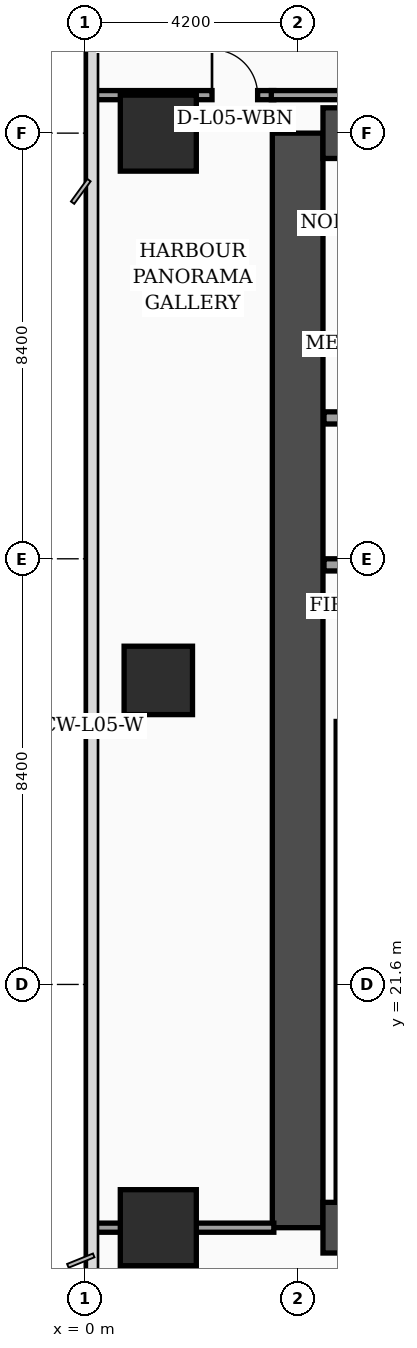
"""IFC4 building model, lengths in metres.
Left out: names, types, materials, properties, quantities, classifications, styles, units other than length and angle.
Written with IfcOpenShell. Run it as: python <this file> out.ifc"""

import sys

from ifc_helpers import new_model, si_unit, direction, frame, frame_2d, origin, origin_2d, place, context, subcontext, project, spatial, rectangle, extrude, element, fill, save


model = new_model("IFC4")
c1 = context("Model", 3, precision=1e-05, world=origin(), true_north=direction((0.0, 1.0)))
c2 = subcontext(c1, "Body", "Model", "MODEL_VIEW")
j1 = project(units=[si_unit("LENGTHUNIT", "METRE"), si_unit("PLANEANGLEUNIT", "RADIAN")], contexts=[c1])
p1 = place(None, origin())
s1 = spatial("IfcSite", under=j1, at=p1, CompositionType="ELEMENT")
p2 = place(p1, origin())
s2 = spatial("IfcBuilding", under=s1, at=p2, CompositionType="ELEMENT")
p3 = place(p2, frame((0.0, 0.0, 27.0)))
s3 = spatial("IfcBuildingStorey", under=s2, at=p3, CompositionType="ELEMENT", Elevation=27.0)
p4 = place(p3, frame((4.2, 16.8, 0.0), z_axis=(0.0, 0.0, 1.0), x_axis=(0.0, 1.0, 0.0)))
e1 = element("IfcWall", 1, at=p4, inside=s3, PredefinedType="SHEAR", context=c2, shape_type="SweptSolid", body=[
    extrude(rectangle(XDim=21.6, YDim=1.0, at=frame_2d((10.8, 0.0))), origin(), (0.0, 0.0, 1.0), 3.56),
])
for number, where, z_axis, x_axis in (
    (2, (4.7, 38.4, 0.0), (0.0, 0.0, 1.0), (1.0, 0.0, 0.0)),
    (3, (4.7, 16.8, 0.0), (0.0, 0.0, 1.0), (1.0, 0.0, 0.0)),
):
    element("IfcWall", number, at=place(p3, frame(where, z_axis=z_axis, x_axis=x_axis)), inside=s3, PredefinedType="SHEAR", context=c2, shape_type="SweptSolid", body=[
        extrude(rectangle(XDim=9.8, YDim=1.0, at=frame_2d((4.9, 0.0))), origin(), (0.0, 0.0, 1.0), 3.56),
    ])
p5 = place(p3, frame((5.08, 17.3, 0.0), z_axis=(0.0, 0.0, 1.0), x_axis=(0.0, 1.0, 0.0)))
e4 = element("IfcWall", 4, at=p5, inside=s3, PredefinedType="SOLIDWALL", context=c2, shape_type="SweptSolid", body=[
    extrude(rectangle(XDim=9.49, YDim=0.24, at=frame_2d((4.745, 0.0))), origin(), (0.0, 0.0, 1.0), 3.56),
])
p6 = place(p3, frame((1.45, 16.8, 0.0), z_axis=(0.0, 0.0, 1.0), x_axis=(1.0, 0.0, 0.0)))
e5 = element("IfcColumn", 5, at=p6, inside=s3, PredefinedType="COLUMN", context=c2, shape_type="SweptSolid", body=[
    extrude(rectangle(XDim=1.5, YDim=1.5, at=origin_2d()), origin(), (0.0, 0.0, 1.0), 3.56),
])
p7 = place(p3, frame((1.45, 27.6, 0.0), z_axis=(0.0, 0.0, 1.0), x_axis=(1.0, 0.0, 0.0)))
e6 = element("IfcColumn", 6, at=p7, inside=s3, PredefinedType="COLUMN", context=c2, shape_type="SweptSolid", body=[
    extrude(rectangle(XDim=1.35, YDim=1.35, at=origin_2d()), origin(), (0.0, 0.0, 1.0), 3.56),
])
p8 = place(p3, frame((1.45, 38.4, 0.0), z_axis=(0.0, 0.0, 1.0), x_axis=(1.0, 0.0, 0.0)))
e7 = element("IfcColumn", 7, at=p8, inside=s3, PredefinedType="COLUMN", context=c2, shape_type="SweptSolid", body=[
    extrude(rectangle(XDim=1.5, YDim=1.5, at=origin_2d()), origin(), (0.0, 0.0, 1.0), 3.56),
])
p9 = place(p3, frame((4.72, 29.88, 0.0), z_axis=(0.0, 0.0, 1.0), x_axis=(1.0, 0.0, 0.0)))
e8 = element("IfcWall", 8, at=p9, inside=s3, PredefinedType="SOLIDWALL", context=c2, shape_type="SweptSolid", body=[
    extrude(rectangle(XDim=4.7, YDim=0.24, at=frame_2d((2.35, 0.0))), origin(), (0.0, 0.0, 1.0), 3.56),
])
p10 = place(p9, frame((0.45, 0.0, 0.0)))
e9 = element("IfcOpeningElement", 9, at=p10, cuts=e8, PredefinedType="OPENING", context=c2, shape_type="SweptSolid", body=[
    extrude(rectangle(XDim=1.3, YDim=2.35, at=frame_2d((0.65, 1.175))), frame((0.0, 0.13, 0.0), z_axis=(0.0, -1.0, 0.0), x_axis=(1.0, 0.0, 0.0)), (0.0, 0.0, 1.0), 0.26),
])
p11 = place(p3, frame((4.72, 32.78, 0.0), z_axis=(0.0, 0.0, 1.0), x_axis=(1.0, 0.0, 0.0)))
e10 = element("IfcWall", 10, at=p11, inside=s3, PredefinedType="SOLIDWALL", context=c2, shape_type="SweptSolid", body=[
    extrude(rectangle(XDim=4.7, YDim=0.24, at=frame_2d((2.35, 0.0))), origin(), (0.0, 0.0, 1.0), 3.56),
])
p12 = place(p3, frame((0.08, 16.8, 0.0), z_axis=(0.0, 0.0, 1.0), x_axis=(1.0, 0.0, 0.0)))
e11 = element("IfcWall", 11, at=p12, inside=s3, PredefinedType="PARTITIONING", context=c2, shape_type="SweptSolid", body=[
    extrude(rectangle(XDim=3.65, YDim=0.18, at=frame_2d((1.825, 0.0))), origin(), (0.0, 0.0, 1.0), 2.84),
])
p13 = place(p3, frame((0.08, 39.15, 0.0), z_axis=(0.0, 0.0, 1.0), x_axis=(1.0, 0.0, 0.0)))
e12 = element("IfcWall", 12, at=p13, inside=s3, PredefinedType="PARTITIONING", context=c2, shape_type="SweptSolid", body=[
    extrude(rectangle(XDim=3.65, YDim=0.18, at=frame_2d((1.825, 0.0))), origin(), (0.0, 0.0, 1.0), 2.84),
])
p14 = place(p13, frame((2.43, 0.0, 0.0)))
e13 = element("IfcOpeningElement", 13, at=p14, cuts=e12, PredefinedType="OPENING", context=c2, shape_type="SweptSolid", body=[
    extrude(rectangle(XDim=0.9, YDim=2.15, at=frame_2d((0.45, 1.075))), frame((0.0, 0.1, 0.0), z_axis=(0.0, -1.0, 0.0), x_axis=(1.0, 0.0, 0.0)), (0.0, 0.0, 1.0), 0.2),
])
p15 = place(p3, frame((3.68, 39.15, 0.0), z_axis=(0.0, 0.0, 1.0), x_axis=(1.0, 0.0, 0.0)))
e14 = element("IfcWall", 14, at=p15, inside=s3, PredefinedType="PARTITIONING", context=c2, shape_type="SweptSolid", body=[
    extrude(rectangle(XDim=11.47, YDim=0.18, at=frame_2d((5.735, 0.0))), origin(), (0.0, 0.0, 1.0), 2.84),
])
p16 = place(p14, origin())
e15 = element("IfcDoor", 15, at=p16, inside=s3, OperationType="SINGLE_SWING_LEFT", PredefinedType="DOOR", context=c2, shape_type="SweptSolid", body=[
    extrude(rectangle(XDim=0.9, YDim=2.15, at=frame_2d((0.45, 1.075))), frame((0.0, 0.025, 0.0), z_axis=(0.0, -1.0, 0.0), x_axis=(1.0, 0.0, 0.0)), (0.0, 0.0, 1.0), 0.05),
])
fill(e13, e15)
save(model, sys.argv[1])
